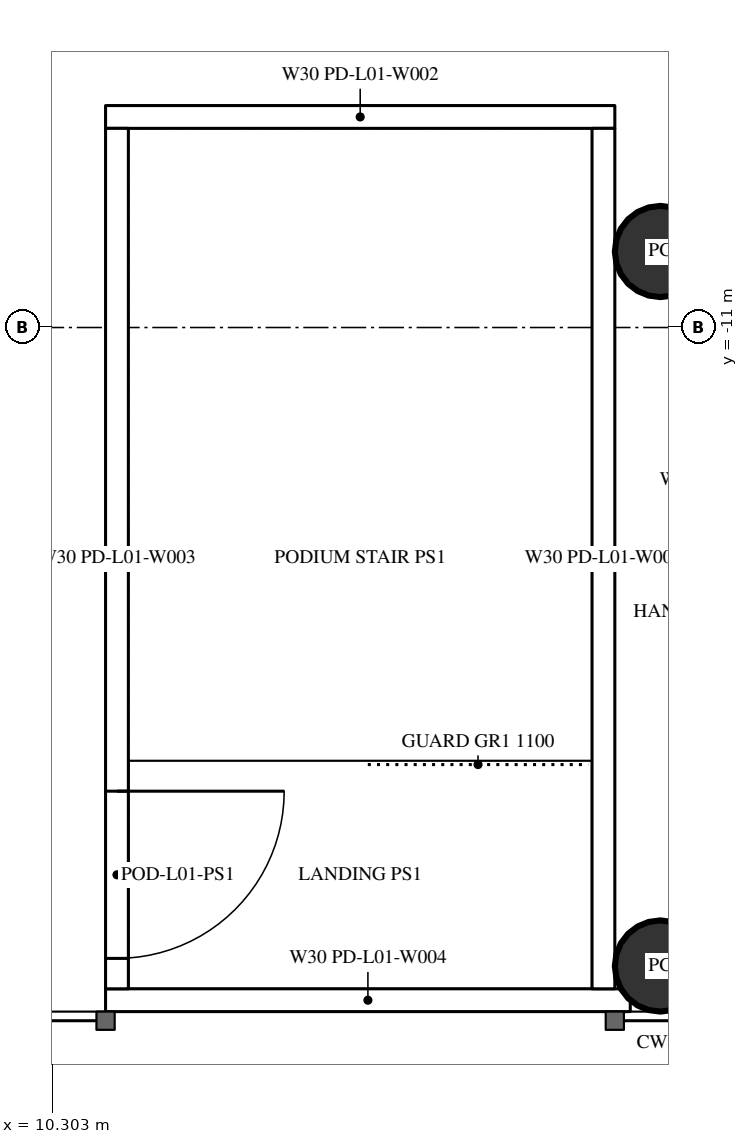
"""IFC4 building model, lengths in metres.
Left out: names, types, materials, properties, quantities, classifications, styles, units other than length and angle.
Written with IfcOpenShell. Run it as: python <this file> out.ifc"""

import sys

from ifc_helpers import new_model, si_unit, direction, frame, frame_2d, origin, origin_2d, place, context, subcontext, project, spatial, rectangle, circle, extrude, element, fill, save


model = new_model("IFC4")
c1 = context("Model", 3, precision=1e-05, world=origin(), true_north=direction((0.0, 1.0)))
c2 = subcontext(c1, "Body", "Model", "MODEL_VIEW")
j1 = project(units=[si_unit("LENGTHUNIT", "METRE"), si_unit("PLANEANGLEUNIT", "RADIAN")], contexts=[c1])
p1 = place(None, origin())
s1 = spatial("IfcSite", under=j1, at=p1, CompositionType="ELEMENT")
p2 = place(p1, origin())
s2 = spatial("IfcBuilding", under=s1, at=p2, CompositionType="ELEMENT")
p3 = place(p2, frame((0.0, 0.0, 7.2)))
s3 = spatial("IfcBuildingStorey", under=s2, at=p3, CompositionType="ELEMENT", Elevation=7.2)
for number, where, z_axis, x_axis in (
    (1, (18.3, -19.4, 0.0), (0.0, 0.0, 1.0), (1.0, 0.0, 0.0)),
    (2, (18.3, -10.0, 0.0), (0.0, 0.0, 1.0), (1.0, 0.0, 0.0)),
):
    element("IfcColumn", number, at=place(p3, frame(where, z_axis=z_axis, x_axis=x_axis)), inside=s3, PredefinedType="COLUMN", context=c2, shape_type="SweptSolid", body=[
        extrude(circle(Radius=0.6, at=origin_2d()), origin(), (0.0, 0.0, 1.0), 5.4),
    ])
p4 = place(p3, frame((17.903, -19.85, 0.0), z_axis=(0.0, 0.0, 1.0), x_axis=(-1.0, 0.0, 0.0)))
e3 = element("IfcWall", 3, at=p4, inside=s3, PredefinedType="SOLIDWALL", context=c2, shape_type="SweptSolid", body=[
    extrude(rectangle(XDim=6.903, YDim=0.3, at=frame_2d((3.452, 0.0))), origin(), (0.0, 0.0, 1.0), 5.05),
])
p5 = place(p3, frame((11.0, -8.23, 0.0), z_axis=(0.0, 0.0, 1.0), x_axis=(1.0, 0.0, 0.0)))
e4 = element("IfcWall", 4, at=p5, inside=s3, PredefinedType="SOLIDWALL", context=c2, shape_type="SweptSolid", body=[
    extrude(rectangle(XDim=6.7, YDim=0.3, at=frame_2d((3.35, 0.0))), origin(), (0.0, 0.0, 1.0), 5.05),
])
p6 = place(p3, frame((11.15, -8.38, 0.0), z_axis=(0.0, 0.0, 1.0), x_axis=(0.0, -1.0, 0.0)))
e5 = element("IfcWall", 5, at=p6, inside=s3, PredefinedType="SOLIDWALL", context=c2, shape_type="SweptSolid", body=[
    extrude(rectangle(XDim=11.32, YDim=0.3, at=frame_2d((5.66, 0.0))), origin(), (0.0, 0.0, 1.0), 5.05),
])
p7 = place(p6, frame((8.72, 0.0, 0.0)))
e6 = element("IfcOpeningElement", 6, at=p7, cuts=e5, PredefinedType="OPENING", context=c2, shape_type="SweptSolid", body=[
    extrude(rectangle(XDim=2.2, YDim=2.2, at=frame_2d((1.1, 1.1))), frame((0.0, 0.16, 0.0), z_axis=(0.0, -1.0, 0.0), x_axis=(1.0, 0.0, 0.0)), (0.0, 0.0, 1.0), 0.32),
])
p8 = place(p3, frame((17.55, -8.38, 0.0), z_axis=(0.0, 0.0, 1.0), x_axis=(0.0, -1.0, 0.0)))
e7 = element("IfcWall", 7, at=p8, inside=s3, PredefinedType="SOLIDWALL", context=c2, shape_type="SweptSolid", body=[
    extrude(rectangle(XDim=11.32, YDim=0.3, at=frame_2d((5.66, 0.0))), origin(), (0.0, 0.0, 1.0), 5.05),
])
p9 = place(p7, origin())
e8 = element("IfcDoor", 8, at=p9, inside=s3, OperationType="DOUBLE_DOOR_SINGLE_SWING", PredefinedType="DOOR", context=c2, shape_type="SweptSolid", body=[
    extrude(rectangle(XDim=2.2, YDim=2.2, at=frame_2d((1.1, 1.1))), frame((0.0, 0.025, 0.0), z_axis=(0.0, -1.0, 0.0), x_axis=(1.0, 0.0, 0.0)), (0.0, 0.0, 1.0), 0.05),
])
fill(e6, e8)
save(model, sys.argv[1])
